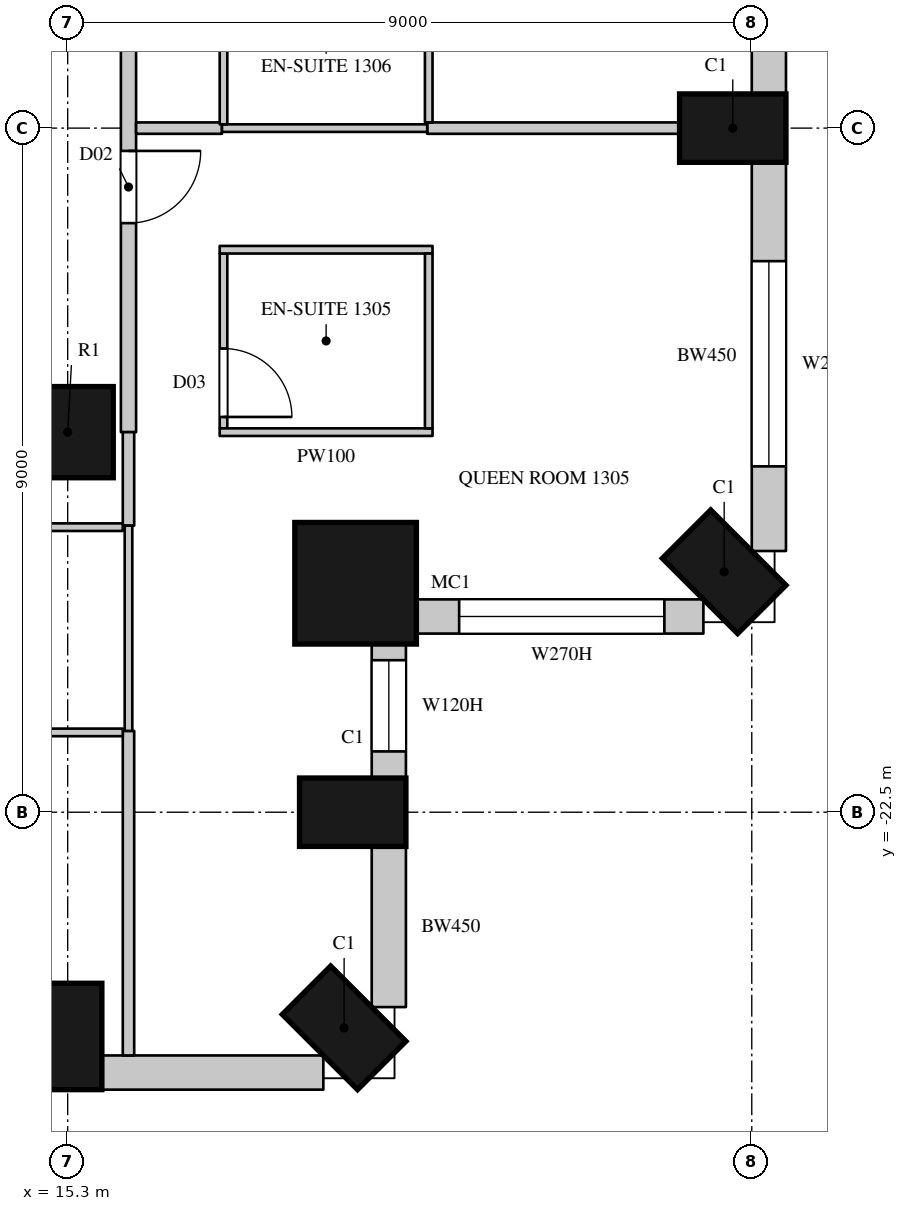
"""IFC4 building model, lengths in metres.
Left out: names, types, materials, properties, quantities, classifications, styles, units other than length and angle.
Written with IfcOpenShell. Run it as: python <this file> out.ifc"""

import sys

from ifc_helpers import new_model, si_unit, direction, frame, frame_2d, origin, origin_2d, place, context, subcontext, project, spatial, rectangle, circle, extrude, element, fill, save


model = new_model("IFC4")
c1 = context("Model", 3, precision=1e-05, world=origin(), true_north=direction((0.0, 1.0)))
c2 = subcontext(c1, "Body", "Model", "MODEL_VIEW")
j1 = project(units=[si_unit("LENGTHUNIT", "METRE"), si_unit("PLANEANGLEUNIT", "RADIAN")], contexts=[c1])
p1 = place(None, origin())
s1 = spatial("IfcSite", under=j1, at=p1, CompositionType="ELEMENT")
p2 = place(p1, origin())
s2 = spatial("IfcBuilding", under=s1, at=p2, CompositionType="ELEMENT")
p3 = place(p2, frame((0.0, 0.0, 77.1)))
s3 = spatial("IfcBuildingStorey", under=s2, at=p3, CompositionType="ELEMENT", Elevation=77.1)
for number, where, z_axis, x_axis in (
    (1, (15.3, -25.45, 0.0), (0.0, 0.0, 1.0), (1.0, 0.0, 0.0)),
    (2, (18.937, -25.337, 0.0), (0.0, 0.0, 1.0), (0.707, 0.707, 0.0)),
    (3, (19.05, -22.5, 0.0), (0.0, 0.0, 1.0), (0.0, 1.0, 0.0)),
):
    element("IfcColumn", number, at=place(p3, frame(where, z_axis=z_axis, x_axis=x_axis)), inside=s3, PredefinedType="COLUMN", context=c2, shape_type="SweptSolid", body=[
        extrude(rectangle(XDim=0.9, YDim=1.4, at=origin_2d()), origin(), (0.0, 0.0, 1.0), 3.6),
    ])
p4 = place(p3, frame((19.088, -19.488, 0.0), z_axis=(0.0, 0.0, 1.0), x_axis=(1.0, 0.0, 0.0)))
e4 = element("IfcColumn", 4, at=p4, inside=s3, PredefinedType="COLUMN", context=c2, shape_type="SweptSolid", body=[
    extrude(circle(Radius=0.8, at=origin_2d()), origin(), (0.0, 0.0, 1.0), 3.6),
])
for number, where, z_axis, x_axis in (
    (5, (23.937, -19.337, 0.0), (0.0, 0.0, 1.0), (0.707, 0.707, 0.0)),
    (6, (24.05, -13.5, 0.0), (0.0, 0.0, 1.0), (0.0, 1.0, 0.0)),
):
    element("IfcColumn", number, at=place(p3, frame(where, z_axis=z_axis, x_axis=x_axis)), inside=s3, PredefinedType="COLUMN", context=c2, shape_type="SweptSolid", body=[
        extrude(rectangle(XDim=0.9, YDim=1.4, at=origin_2d()), origin(), (0.0, 0.0, 1.0), 3.6),
    ])
p5 = place(p3, frame((15.3, -17.5, 0.0), z_axis=(0.0, 0.0, 1.0), x_axis=(1.0, 0.0, 0.0)))
e7 = element("IfcColumn", 7, at=p5, inside=s3, PredefinedType="COLUMN", context=c2, shape_type="SweptSolid", body=[
    extrude(circle(Radius=0.6, at=origin_2d()), origin(), (0.0, 0.0, 1.0), 3.6),
])
p6 = place(p3, frame((15.75, -25.925, 0.0), z_axis=(0.0, 0.0, 1.0), x_axis=(1.0, 0.0, 0.0)))
e8 = element("IfcWall", 8, at=p6, inside=s3, PredefinedType="SOLIDWALL", context=c2, shape_type="SweptSolid", body=[
    extrude(rectangle(XDim=2.914, YDim=0.45, at=frame_2d((1.457, 0.0))), origin(), (0.0, 0.0, 1.0), 3.3),
])
p7 = place(p3, frame((19.525, -25.064, 0.0), z_axis=(0.0, 0.0, 1.0), x_axis=(0.0, 1.0, 0.0)))
e9 = element("IfcWall", 9, at=p7, inside=s3, PredefinedType="SOLIDWALL", context=c2, shape_type="SweptSolid", body=[
    extrude(rectangle(XDim=2.114, YDim=0.45, at=frame_2d((1.057, 0.0))), origin(), (0.0, 0.0, 1.0), 3.3),
])
p8 = place(p3, frame((19.525, -22.05, 0.0), z_axis=(0.0, 0.0, 1.0), x_axis=(0.0, 1.0, 0.0)))
e10 = element("IfcWall", 10, at=p8, inside=s3, PredefinedType="SOLIDWALL", context=c2, shape_type="SweptSolid", body=[
    extrude(rectangle(XDim=1.792, YDim=0.45, at=frame_2d((0.896, 0.0))), origin(), (0.0, 0.0, 1.0), 3.3),
])
p9 = place(p8, frame((0.35, 0.0, 1.05)))
e11 = element("IfcOpeningElement", 11, at=p9, cuts=e10, PredefinedType="OPENING", context=c2, shape_type="SweptSolid", body=[
    extrude(rectangle(XDim=1.2, YDim=2.0, at=frame_2d((0.6, 1.0))), frame((0.0, 0.235, 0.0), z_axis=(0.0, -1.0, 0.0), x_axis=(1.0, 0.0, 0.0)), (0.0, 0.0, 1.0), 0.47),
])
p10 = place(p3, frame((19.858, -19.925, 0.0), z_axis=(0.0, 0.0, 1.0), x_axis=(1.0, 0.0, 0.0)))
e12 = element("IfcWall", 12, at=p10, inside=s3, PredefinedType="SOLIDWALL", context=c2, shape_type="SweptSolid", body=[
    extrude(rectangle(XDim=3.805, YDim=0.45, at=frame_2d((1.903, 0.0))), origin(), (0.0, 0.0, 1.0), 3.3),
])
p11 = place(p10, frame((0.592, 0.0, 1.05)))
e13 = element("IfcOpeningElement", 13, at=p11, cuts=e12, PredefinedType="OPENING", context=c2, shape_type="SweptSolid", body=[
    extrude(rectangle(XDim=2.7, YDim=2.0, at=frame_2d((1.35, 1.0))), frame((0.0, 0.235, 0.0), z_axis=(0.0, -1.0, 0.0), x_axis=(1.0, 0.0, 0.0)), (0.0, 0.0, 1.0), 0.47),
])
p12 = place(p3, frame((24.525, -19.064, 0.0), z_axis=(0.0, 0.0, 1.0), x_axis=(0.0, 1.0, 0.0)))
e14 = element("IfcWall", 14, at=p12, inside=s3, PredefinedType="SOLIDWALL", context=c2, shape_type="SweptSolid", body=[
    extrude(rectangle(XDim=5.114, YDim=0.45, at=frame_2d((2.557, 0.0))), origin(), (0.0, 0.0, 1.0), 3.3),
])
p13 = place(p12, frame((1.114, 0.0, 1.05)))
e15 = element("IfcOpeningElement", 15, at=p13, cuts=e14, PredefinedType="OPENING", context=c2, shape_type="SweptSolid", body=[
    extrude(rectangle(XDim=2.7, YDim=2.0, at=frame_2d((1.35, 1.0))), frame((0.0, 0.235, 0.0), z_axis=(0.0, -1.0, 0.0), x_axis=(1.0, 0.0, 0.0)), (0.0, 0.0, 1.0), 0.47),
])
p14 = place(p3, frame((24.525, -13.05, 0.0), z_axis=(0.0, 0.0, 1.0), x_axis=(0.0, 1.0, 0.0)))
e16 = element("IfcWall", 16, at=p14, inside=s3, PredefinedType="SOLIDWALL", context=c2, shape_type="SweptSolid", body=[
    extrude(rectangle(XDim=8.1, YDim=0.45, at=frame_2d((4.05, 0.0))), origin(), (0.0, 0.0, 1.0), 3.3),
])
p15 = place(p14, frame((0.9, 0.0, 0.0)))
e17 = element("IfcOpeningElement", 17, at=p15, cuts=e16, PredefinedType="OPENING", context=c2, shape_type="SweptSolid", body=[
    extrude(rectangle(XDim=1.8, YDim=2.4, at=frame_2d((0.9, 1.2))), frame((0.0, 0.235, 0.0), z_axis=(0.0, -1.0, 0.0), x_axis=(1.0, 0.0, 0.0)), (0.0, 0.0, 1.0), 0.47),
])
p16 = place(p14, frame((4.7, 0.0, 0.0)))
e18 = element("IfcOpeningElement", 18, at=p16, cuts=e16, PredefinedType="OPENING", context=c2, shape_type="SweptSolid", body=[
    extrude(rectangle(XDim=1.8, YDim=2.4, at=frame_2d((0.9, 1.2))), frame((0.0, 0.235, 0.0), z_axis=(0.0, -1.0, 0.0), x_axis=(1.0, 0.0, 0.0)), (0.0, 0.0, 1.0), 0.47),
])
p17 = place(p14, frame((6.7, 0.0, 1.05)))
e19 = element("IfcOpeningElement", 19, at=p17, cuts=e16, PredefinedType="OPENING", context=c2, shape_type="SweptSolid", body=[
    extrude(rectangle(XDim=1.2, YDim=2.0, at=frame_2d((0.6, 1.0))), frame((0.0, 0.235, 0.0), z_axis=(0.0, -1.0, 0.0), x_axis=(1.0, 0.0, 0.0)), (0.0, 0.0, 1.0), 0.47),
])
p18 = place(p3, frame((16.1, -17.5, 0.0), z_axis=(0.0, 0.0, 1.0), x_axis=(0.0, 1.0, 0.0)))
e20 = element("IfcWall", 20, at=p18, inside=s3, PredefinedType="PARTITIONING", context=c2, shape_type="SweptSolid", body=[
    extrude(rectangle(XDim=12.75, YDim=0.2, at=frame_2d((6.375, 0.0))), origin(), (0.0, 0.0, 1.0), 3.3),
])
p19 = place(p18, frame((2.75, 0.0, 0.0)))
e21 = element("IfcOpeningElement", 21, at=p19, cuts=e20, PredefinedType="OPENING", context=c2, shape_type="SweptSolid", body=[
    extrude(rectangle(XDim=0.95, YDim=2.2, at=frame_2d((0.475, 1.1))), frame((0.0, 0.11, 0.0), z_axis=(0.0, -1.0, 0.0), x_axis=(1.0, 0.0, 0.0)), (0.0, 0.0, 1.0), 0.22),
])
p20 = place(p18, frame((6.95, 0.0, 0.0)))
e22 = element("IfcOpeningElement", 22, at=p20, cuts=e20, PredefinedType="OPENING", context=c2, shape_type="SweptSolid", body=[
    extrude(rectangle(XDim=0.95, YDim=2.2, at=frame_2d((0.475, 1.1))), frame((0.0, 0.11, 0.0), z_axis=(0.0, -1.0, 0.0), x_axis=(1.0, 0.0, 0.0)), (0.0, 0.0, 1.0), 0.22),
])
p21 = place(p18, frame((11.4, 0.0, 0.0)))
e23 = element("IfcOpeningElement", 23, at=p21, cuts=e20, PredefinedType="OPENING", context=c2, shape_type="SweptSolid", body=[
    extrude(rectangle(XDim=0.95, YDim=2.2, at=frame_2d((0.475, 1.1))), frame((0.0, 0.11, 0.0), z_axis=(0.0, -1.0, 0.0), x_axis=(1.0, 0.0, 0.0)), (0.0, 0.0, 1.0), 0.22),
])
p22 = place(p3, frame((16.1, -25.7, 0.0), z_axis=(0.0, 0.0, 1.0), x_axis=(0.0, 1.0, 0.0)))
e24 = element("IfcWall", 24, at=p22, inside=s3, PredefinedType="PARTITIONING", context=c2, shape_type="SweptSolid", body=[
    extrude(rectangle(XDim=4.27, YDim=0.15, at=frame_2d((2.135, 0.0))), origin(), (0.0, 0.0, 1.0), 3.3),
])
p23 = place(p3, frame((16.1, -18.73, 0.0), z_axis=(0.0, 0.0, 1.0), x_axis=(0.0, 1.0, 0.0)))
e25 = element("IfcWall", 25, at=p23, inside=s3, PredefinedType="PARTITIONING", context=c2, shape_type="SweptSolid", body=[
    extrude(rectangle(XDim=1.23, YDim=0.15, at=frame_2d((0.615, 0.0))), origin(), (0.0, 0.0, 1.0), 3.3),
])
p24 = place(p3, frame((16.2, -13.5, 0.0), z_axis=(0.0, 0.0, 1.0), x_axis=(1.0, 0.0, 0.0)))
e26 = element("IfcWall", 26, at=p24, inside=s3, PredefinedType="PARTITIONING", context=c2, shape_type="SweptSolid", body=[
    extrude(rectangle(XDim=1.13, YDim=0.15, at=frame_2d((0.565, 0.0))), origin(), (0.0, 0.0, 1.0), 3.3),
])
p25 = place(p3, frame((20.03, -13.5, 0.0), z_axis=(0.0, 0.0, 1.0), x_axis=(1.0, 0.0, 0.0)))
e27 = element("IfcWall", 27, at=p25, inside=s3, PredefinedType="PARTITIONING", context=c2, shape_type="SweptSolid", body=[
    extrude(rectangle(XDim=3.32, YDim=0.15, at=frame_2d((1.66, 0.0))), origin(), (0.0, 0.0, 1.0), 3.3),
])
for number, where, z_axis, x_axis in (
    (28, (13.65, -21.45, 0.0), (0.0, 0.0, 1.0), (1.0, 0.0, 0.0)),
    (29, (13.65, -18.75, 0.0), (0.0, 0.0, 1.0), (1.0, 0.0, 0.0)),
):
    element("IfcWall", number, at=place(p3, frame(where, z_axis=z_axis, x_axis=x_axis)), inside=s3, PredefinedType="PARTITIONING", context=c2, shape_type="SweptSolid", body=[
        extrude(rectangle(XDim=2.375, YDim=0.1, at=frame_2d((1.188, 0.0))), origin(), (0.0, 0.0, 1.0), 3.3),
    ])
for number, where, z_axis, x_axis in (
    (30, (16.1, -21.43, 0.0), (0.0, 0.0, 1.0), (0.0, 1.0, 0.0)),
    (31, (17.33, -13.5, 0.0), (0.0, 0.0, 1.0), (1.0, 0.0, 0.0)),
):
    element("IfcWall", number, at=place(p3, frame(where, z_axis=z_axis, x_axis=x_axis)), inside=s3, PredefinedType="PARTITIONING", context=c2, shape_type="SweptSolid", body=[
        extrude(rectangle(XDim=2.7, YDim=0.1, at=frame_2d((1.35, 0.0))), origin(), (0.0, 0.0, 1.0), 3.3),
    ])
p26 = place(p3, frame((17.35, -17.45, 0.0), z_axis=(0.0, 0.0, 1.0), x_axis=(0.0, 1.0, 0.0)))
e32 = element("IfcWall", 32, at=p26, inside=s3, PredefinedType="PARTITIONING", context=c2, shape_type="SweptSolid", body=[
    extrude(rectangle(XDim=2.3, YDim=0.1, at=frame_2d((1.15, 0.0))), origin(), (0.0, 0.0, 1.0), 3.3),
])
p27 = place(p26, frame((0.15, 0.0, 0.0)))
e33 = element("IfcOpeningElement", 33, at=p27, cuts=e32, PredefinedType="OPENING", context=c2, shape_type="SweptSolid", body=[
    extrude(rectangle(XDim=0.9, YDim=2.2, at=frame_2d((0.45, 1.1))), frame((0.0, 0.06, 0.0), z_axis=(0.0, -1.0, 0.0), x_axis=(1.0, 0.0, 0.0)), (0.0, 0.0, 1.0), 0.12),
])
for number, where, z_axis, x_axis in (
    (34, (17.3, -17.5, 0.0), (0.0, 0.0, 1.0), (1.0, 0.0, 0.0)),
    (35, (17.3, -15.1, 0.0), (0.0, 0.0, 1.0), (1.0, 0.0, 0.0)),
):
    element("IfcWall", number, at=place(p3, frame(where, z_axis=z_axis, x_axis=x_axis)), inside=s3, PredefinedType="PARTITIONING", context=c2, shape_type="SweptSolid", body=[
        extrude(rectangle(XDim=2.8, YDim=0.1, at=frame_2d((1.4, 0.0))), origin(), (0.0, 0.0, 1.0), 3.3),
    ])
p28 = place(p3, frame((17.35, -13.45, 0.0), z_axis=(0.0, 0.0, 1.0), x_axis=(0.0, 1.0, 0.0)))
e36 = element("IfcWall", 36, at=p28, inside=s3, PredefinedType="PARTITIONING", context=c2, shape_type="SweptSolid", body=[
    extrude(rectangle(XDim=2.296, YDim=0.1, at=frame_2d((1.148, 0.0))), origin(), (0.0, 0.0, 1.0), 3.3),
])
p29 = place(p28, frame((1.2, 0.0, 0.0)))
e37 = element("IfcOpeningElement", 37, at=p29, cuts=e36, PredefinedType="OPENING", context=c2, shape_type="SweptSolid", body=[
    extrude(rectangle(XDim=0.9, YDim=2.2, at=frame_2d((0.45, 1.1))), frame((0.0, 0.06, 0.0), z_axis=(0.0, -1.0, 0.0), x_axis=(1.0, 0.0, 0.0)), (0.0, 0.0, 1.0), 0.12),
])
p30 = place(p3, frame((20.05, -17.45, 0.0), z_axis=(0.0, 0.0, 1.0), x_axis=(0.0, 1.0, 0.0)))
e38 = element("IfcWall", 38, at=p30, inside=s3, PredefinedType="PARTITIONING", context=c2, shape_type="SweptSolid", body=[
    extrude(rectangle(XDim=2.3, YDim=0.1, at=frame_2d((1.15, 0.0))), origin(), (0.0, 0.0, 1.0), 3.3),
])
p31 = place(p3, frame((20.05, -13.425, 0.0), z_axis=(0.0, 0.0, 1.0), x_axis=(0.0, 1.0, 0.0)))
e39 = element("IfcWall", 39, at=p31, inside=s3, PredefinedType="PARTITIONING", context=c2, shape_type="SweptSolid", body=[
    extrude(rectangle(XDim=2.271, YDim=0.1, at=frame_2d((1.135, 0.0))), origin(), (0.0, 0.0, 1.0), 3.3),
])
p32 = place(p9, origin())
e40 = element("IfcWindow", 40, at=p32, inside=s3, PartitioningType="SINGLE_PANEL", PredefinedType="WINDOW", context=c2, shape_type="SweptSolid", body=[
    extrude(rectangle(XDim=1.2, YDim=2.0, at=frame_2d((0.6, 1.0))), frame((0.0, 0.135, 0.0), z_axis=(0.0, -1.0, 0.0), x_axis=(1.0, 0.0, 0.0)), (0.0, 0.0, 1.0), 0.06),
])
fill(e11, e40)
p33 = place(p11, origin())
e41 = element("IfcWindow", 41, at=p33, inside=s3, PartitioningType="SINGLE_PANEL", PredefinedType="WINDOW", context=c2, shape_type="SweptSolid", body=[
    extrude(rectangle(XDim=2.7, YDim=2.0, at=frame_2d((1.35, 1.0))), frame((0.0, 0.135, 0.0), z_axis=(0.0, -1.0, 0.0), x_axis=(1.0, 0.0, 0.0)), (0.0, 0.0, 1.0), 0.06),
])
fill(e13, e41)
p34 = place(p13, origin())
e42 = element("IfcWindow", 42, at=p34, inside=s3, PartitioningType="SINGLE_PANEL", PredefinedType="WINDOW", context=c2, shape_type="SweptSolid", body=[
    extrude(rectangle(XDim=2.7, YDim=2.0, at=frame_2d((1.35, 1.0))), frame((0.0, 0.135, 0.0), z_axis=(0.0, -1.0, 0.0), x_axis=(1.0, 0.0, 0.0)), (0.0, 0.0, 1.0), 0.06),
])
fill(e15, e42)
p35 = place(p19, origin())
e43 = element("IfcDoor", 43, at=p35, inside=s3, OperationType="SINGLE_SWING_LEFT", PredefinedType="DOOR", context=c2, shape_type="SweptSolid", body=[
    extrude(rectangle(XDim=0.95, YDim=2.2, at=frame_2d((0.475, 1.1))), frame((0.0, 0.025, 0.0), z_axis=(0.0, -1.0, 0.0), x_axis=(1.0, 0.0, 0.0)), (0.0, 0.0, 1.0), 0.05),
])
fill(e21, e43)
p36 = place(p27, origin())
e44 = element("IfcDoor", 44, at=p36, inside=s3, OperationType="SINGLE_SWING_RIGHT", PredefinedType="DOOR", context=c2, shape_type="SweptSolid", body=[
    extrude(rectangle(XDim=0.9, YDim=2.2, at=frame_2d((0.45, 1.1))), frame((0.0, 0.025, 0.0), z_axis=(0.0, -1.0, 0.0), x_axis=(1.0, 0.0, 0.0)), (0.0, 0.0, 1.0), 0.05),
])
fill(e33, e44)
save(model, sys.argv[1])
